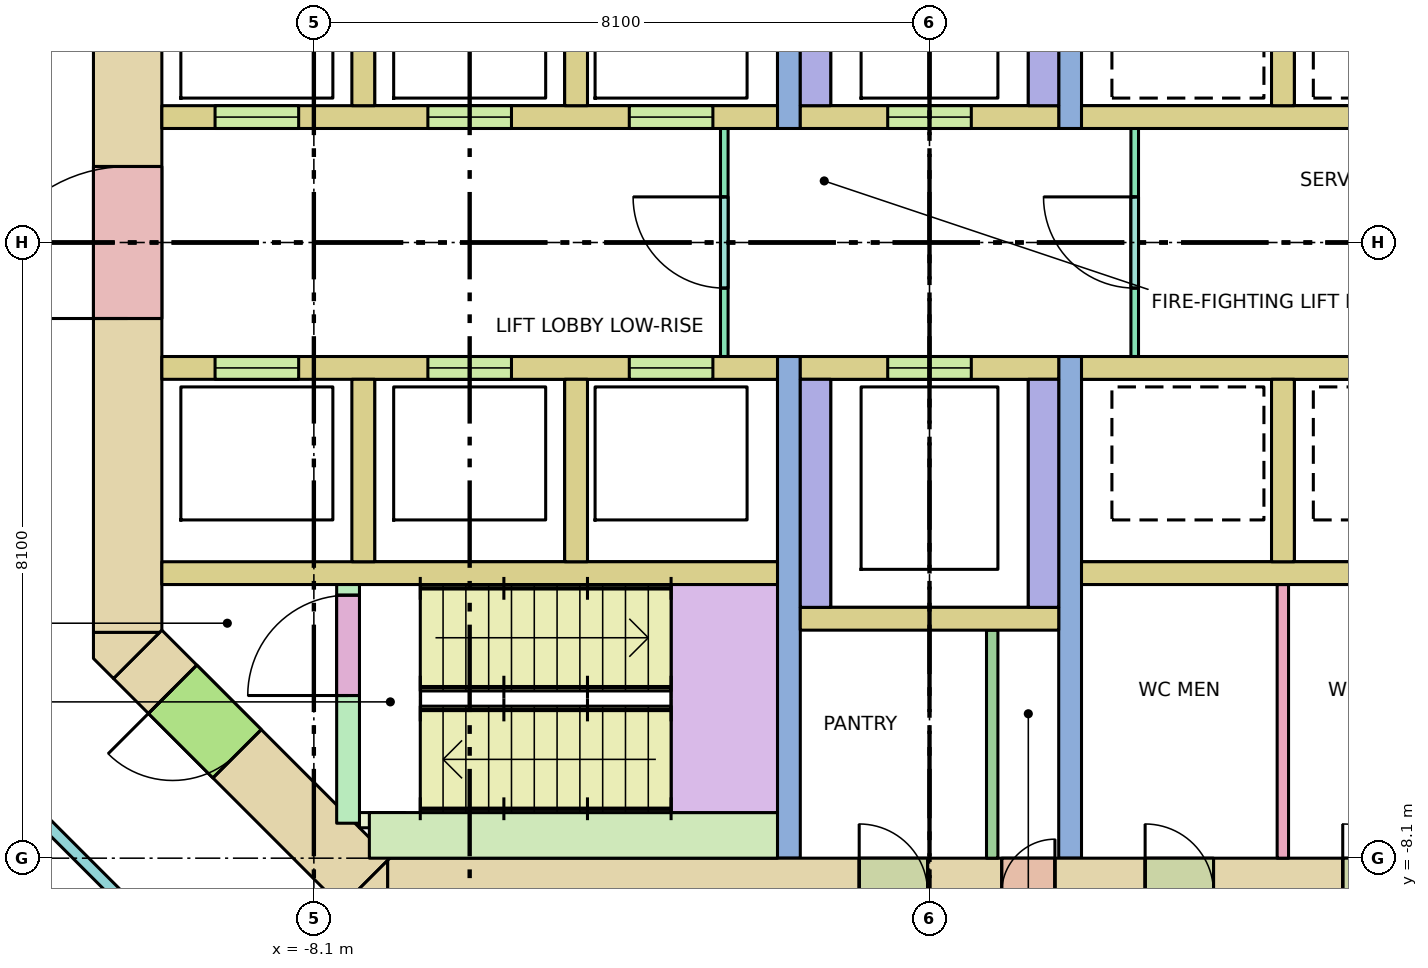
"""IFC4 building model, lengths in metres.
Left out: names, types, materials, properties, quantities, classifications, styles, units other than length and angle.
Written with IfcOpenShell. Run it as: python <this file> out.ifc"""

import sys

from ifc_helpers import new_model, si_unit, direction, frame, frame_2d, origin, place, context, subcontext, project, spatial, polyline, rectangle, outline, extrude, element, fill, save


model = new_model("IFC4")
c1 = context("Model", 3, precision=1e-05, world=origin(), true_north=direction((0.0, 1.0)))
c2 = subcontext(c1, "Body", "Model", "MODEL_VIEW")
j1 = project(units=[si_unit("LENGTHUNIT", "METRE"), si_unit("PLANEANGLEUNIT", "RADIAN")], contexts=[c1])
p1 = place(None, origin())
s1 = spatial("IfcSite", under=j1, at=p1, CompositionType="ELEMENT")
p2 = place(p1, origin())
s2 = spatial("IfcBuilding", under=s1, at=p2, CompositionType="ELEMENT")
p3 = place(p2, frame((0.0, 0.0, 39.0)))
s3 = spatial("IfcBuildingStorey", under=s2, at=p3, CompositionType="ELEMENT", Elevation=39.0)
p4 = place(p3, frame((-7.13, -8.55, -0.28), z_axis=(0.0, 0.0, 1.0), x_axis=(1.0, 0.0, 0.0)))
e1 = element("IfcWall", 1, at=p4, inside=s3, PredefinedType="SHEAR", context=c2, shape_type="SweptSolid", body=[
    extrude(rectangle(XDim=14.26, YDim=0.9, at=frame_2d((7.13, 0.0))), origin(), (0.0, 0.0, 1.0), 4.0),
])
p5 = place(p4, frame((8.08, 0.0, 0.28)))
e2 = element("IfcOpeningElement", 2, at=p5, cuts=e1, PredefinedType="OPENING", context=c2, shape_type="SweptSolid", body=[
    extrude(rectangle(XDim=0.7, YDim=2.1, at=frame_2d((0.35, 1.05))), frame((0.0, 0.46, 0.0), z_axis=(0.0, -1.0, 0.0), x_axis=(1.0, 0.0, 0.0)), (0.0, 0.0, 1.0), 0.92),
])
p6 = place(p4, frame((6.205, 0.0, 0.28)))
e3 = element("IfcOpeningElement", 3, at=p6, cuts=e1, PredefinedType="OPENING", context=c2, shape_type="SweptSolid", body=[
    extrude(rectangle(XDim=0.9, YDim=2.1, at=frame_2d((0.45, 1.05))), frame((0.0, 0.46, 0.0), z_axis=(0.0, -1.0, 0.0), x_axis=(1.0, 0.0, 0.0)), (0.0, 0.0, 1.0), 0.92),
])
p7 = place(p4, frame((9.967, 0.0, 0.28)))
e4 = element("IfcOpeningElement", 4, at=p7, cuts=e1, PredefinedType="OPENING", context=c2, shape_type="SweptSolid", body=[
    extrude(rectangle(XDim=0.9, YDim=2.1, at=frame_2d((0.45, 1.05))), frame((0.0, 0.46, 0.0), z_axis=(0.0, -1.0, 0.0), x_axis=(1.0, 0.0, 0.0)), (0.0, 0.0, 1.0), 0.92),
])
p8 = place(p4, frame((12.567, 0.0, 0.28)))
e5 = element("IfcOpeningElement", 5, at=p8, cuts=e1, PredefinedType="OPENING", context=c2, shape_type="SweptSolid", body=[
    extrude(rectangle(XDim=0.9, YDim=2.1, at=frame_2d((0.45, 1.05))), frame((0.0, 0.46, 0.0), z_axis=(0.0, -1.0, 0.0), x_axis=(1.0, 0.0, 0.0)), (0.0, 0.0, 1.0), 0.92),
])
p9 = place(p3, frame((-10.55, -5.13, -0.28), z_axis=(0.0, 0.0, 1.0), x_axis=(0.0, 1.0, 0.0)))
e6 = element("IfcWall", 6, at=p9, inside=s3, PredefinedType="SHEAR", context=c2, shape_type="SweptSolid", body=[
    extrude(rectangle(XDim=10.26, YDim=0.9, at=frame_2d((5.13, 0.0))), origin(), (0.0, 0.0, 1.0), 4.0),
])
p10 = place(p9, frame((4.13, 0.0, 0.28)))
e7 = element("IfcOpeningElement", 7, at=p10, cuts=e6, PredefinedType="OPENING", context=c2, shape_type="SweptSolid", body=[
    extrude(rectangle(XDim=2.0, YDim=2.1, at=frame_2d((1.0, 1.05))), frame((0.0, 0.46, 0.0), z_axis=(0.0, -1.0, 0.0), x_axis=(1.0, 0.0, 0.0)), (0.0, 0.0, 1.0), 0.92),
])
p11 = place(p3, frame((-7.418, -8.418, -0.28), z_axis=(0.0, 0.0, 1.0), x_axis=(-0.707106781187, 0.707106781187, 0.0)))
e8 = element("IfcWall", 8, at=p11, inside=s3, PredefinedType="SHEAR", context=c2, shape_type="SweptSolid", body=[
    extrude(rectangle(XDim=4.243, YDim=0.9, at=frame_2d((2.121, 0.0))), origin(), (0.0, 0.0, 1.0), 4.0),
])
p12 = place(p11, frame((2.393, 0.0, 0.28)))
e9 = element("IfcOpeningElement", 9, at=p12, cuts=e8, PredefinedType="OPENING", context=c2, shape_type="SweptSolid", body=[
    extrude(rectangle(XDim=1.2, YDim=2.1, at=frame_2d((0.6, 1.05))), frame((0.0, 0.46, 0.0), z_axis=(0.0, -1.0, 0.0), x_axis=(1.0, 0.0, 0.0)), (0.0, 0.0, 1.0), 0.92),
])
p13 = place(p3, frame((0.0, 0.0, -0.28)))
e10 = element("IfcWall", 10, at=p13, inside=s3, PredefinedType="SHEAR", context=c2, shape_type="SweptSolid", body=[
    extrude(outline(polyline([(-7.473, -9.0), (-7.736, -8.736), (-7.13, -8.13), (-7.13, -9.0), (-7.473, -9.0)])), origin(), (0.0, 0.0, 1.0), 4.0),
])
p14 = place(p3, frame((0.0, 0.0, -0.28)))
e11 = element("IfcWall", 11, at=p14, inside=s3, PredefinedType="SHEAR", context=c2, shape_type="SweptSolid", body=[
    extrude(outline(polyline([(-11.0, -5.473), (-11.0, -5.13), (-10.13, -5.13), (-10.736, -5.736), (-11.0, -5.473)])), origin(), (0.0, 0.0, 1.0), 4.0),
])
for number, where, z_axis, x_axis in (
    (12, (-10.1, -4.35, 0.0), (0.0, 0.0, 1.0), (1.0, 0.0, 0.0)),
    (13, (2.0, -4.35, 0.0), (0.0, 0.0, 1.0), (1.0, 0.0, 0.0)),
):
    element("IfcWall", number, at=place(p3, frame(where, z_axis=z_axis, x_axis=x_axis)), inside=s3, PredefinedType="SOLIDWALL", context=c2, shape_type="SweptSolid", body=[
        extrude(rectangle(XDim=8.1, YDim=0.3, at=frame_2d((4.05, 0.0))), origin(), (0.0, 0.0, 1.0), 3.72),
    ])
p15 = place(p3, frame((-10.1, 1.65, 0.0), z_axis=(0.0, 0.0, 1.0), x_axis=(1.0, 0.0, 0.0)))
e14 = element("IfcWall", 14, at=p15, inside=s3, PredefinedType="SOLIDWALL", context=c2, shape_type="SweptSolid", body=[
    extrude(rectangle(XDim=8.1, YDim=0.3, at=frame_2d((4.05, 0.0))), origin(), (0.0, 0.0, 1.0), 3.72),
])
p16 = place(p15, frame((0.7, 0.0, 0.0)))
e15 = element("IfcOpeningElement", 15, at=p16, cuts=e14, PredefinedType="OPENING", context=c2, shape_type="SweptSolid", body=[
    extrude(rectangle(XDim=1.1, YDim=2.1, at=frame_2d((0.55, 1.05))), frame((0.0, 0.16, 0.0), z_axis=(0.0, -1.0, 0.0), x_axis=(1.0, 0.0, 0.0)), (0.0, 0.0, 1.0), 0.32),
])
p17 = place(p15, frame((3.5, 0.0, 0.0)))
e16 = element("IfcOpeningElement", 16, at=p17, cuts=e14, PredefinedType="OPENING", context=c2, shape_type="SweptSolid", body=[
    extrude(rectangle(XDim=1.1, YDim=2.1, at=frame_2d((0.55, 1.05))), frame((0.0, 0.16, 0.0), z_axis=(0.0, -1.0, 0.0), x_axis=(1.0, 0.0, 0.0)), (0.0, 0.0, 1.0), 0.32),
])
p18 = place(p15, frame((6.15, 0.0, 0.0)))
e17 = element("IfcOpeningElement", 17, at=p18, cuts=e14, PredefinedType="OPENING", context=c2, shape_type="SweptSolid", body=[
    extrude(rectangle(XDim=1.1, YDim=2.1, at=frame_2d((0.55, 1.05))), frame((0.0, 0.16, 0.0), z_axis=(0.0, -1.0, 0.0), x_axis=(1.0, 0.0, 0.0)), (0.0, 0.0, 1.0), 0.32),
])
p19 = place(p3, frame((-10.1, -1.65, 0.0), z_axis=(0.0, 0.0, 1.0), x_axis=(1.0, 0.0, 0.0)))
e18 = element("IfcWall", 18, at=p19, inside=s3, PredefinedType="SOLIDWALL", context=c2, shape_type="SweptSolid", body=[
    extrude(rectangle(XDim=8.1, YDim=0.3, at=frame_2d((4.05, 0.0))), origin(), (0.0, 0.0, 1.0), 3.72),
])
p20 = place(p19, frame((0.7, 0.0, 0.0)))
e19 = element("IfcOpeningElement", 19, at=p20, cuts=e18, PredefinedType="OPENING", context=c2, shape_type="SweptSolid", body=[
    extrude(rectangle(XDim=1.1, YDim=2.1, at=frame_2d((0.55, 1.05))), frame((0.0, 0.16, 0.0), z_axis=(0.0, -1.0, 0.0), x_axis=(1.0, 0.0, 0.0)), (0.0, 0.0, 1.0), 0.32),
])
p21 = place(p19, frame((3.5, 0.0, 0.0)))
e20 = element("IfcOpeningElement", 20, at=p21, cuts=e18, PredefinedType="OPENING", context=c2, shape_type="SweptSolid", body=[
    extrude(rectangle(XDim=1.1, YDim=2.1, at=frame_2d((0.55, 1.05))), frame((0.0, 0.16, 0.0), z_axis=(0.0, -1.0, 0.0), x_axis=(1.0, 0.0, 0.0)), (0.0, 0.0, 1.0), 0.32),
])
p22 = place(p19, frame((6.15, 0.0, 0.0)))
e21 = element("IfcOpeningElement", 21, at=p22, cuts=e18, PredefinedType="OPENING", context=c2, shape_type="SweptSolid", body=[
    extrude(rectangle(XDim=1.1, YDim=2.1, at=frame_2d((0.55, 1.05))), frame((0.0, 0.16, 0.0), z_axis=(0.0, -1.0, 0.0), x_axis=(1.0, 0.0, 0.0)), (0.0, 0.0, 1.0), 0.32),
])
for number, where, z_axis, x_axis in (
    (22, (2.0, 1.65, 0.0), (0.0, 0.0, 1.0), (1.0, 0.0, 0.0)),
    (23, (2.0, -1.65, 0.0), (0.0, 0.0, 1.0), (1.0, 0.0, 0.0)),
):
    element("IfcWall", number, at=place(p3, frame(where, z_axis=z_axis, x_axis=x_axis)), inside=s3, PredefinedType="SOLIDWALL", context=c2, shape_type="SweptSolid", body=[
        extrude(rectangle(XDim=8.1, YDim=0.3, at=frame_2d((4.05, 0.0))), origin(), (0.0, 0.0, 1.0), 3.72),
    ])
for number, where, z_axis, x_axis in (
    (24, (-7.45, 1.8, 0.0), (0.0, 0.0, 1.0), (0.0, 1.0, 0.0)),
    (25, (-7.45, -4.2, 0.0), (0.0, 0.0, 1.0), (0.0, 1.0, 0.0)),
    (26, (-4.65, 1.8, 0.0), (0.0, 0.0, 1.0), (0.0, 1.0, 0.0)),
    (27, (-4.65, -4.2, 0.0), (0.0, 0.0, 1.0), (0.0, 1.0, 0.0)),
    (28, (4.65, 1.8, 0.0), (0.0, 0.0, 1.0), (0.0, 1.0, 0.0)),
    (29, (4.65, -4.2, 0.0), (0.0, 0.0, 1.0), (0.0, 1.0, 0.0)),
):
    element("IfcWall", number, at=place(p3, frame(where, z_axis=z_axis, x_axis=x_axis)), inside=s3, PredefinedType="SOLIDWALL", context=c2, shape_type="SweptSolid", body=[
        extrude(rectangle(XDim=2.4, YDim=0.3, at=frame_2d((1.2, 0.0))), origin(), (0.0, 0.0, 1.0), 3.72),
    ])
for number, where, z_axis, x_axis in (
    (30, (-1.85, 1.5, 0.0), (0.0, 0.0, 1.0), (0.0, 1.0, 0.0)),
    (31, (-1.85, -8.1, 0.0), (0.0, 0.0, 1.0), (0.0, 1.0, 0.0)),
    (32, (1.85, 1.5, 0.0), (0.0, 0.0, 1.0), (0.0, 1.0, 0.0)),
    (33, (1.85, -8.1, 0.0), (0.0, 0.0, 1.0), (0.0, 1.0, 0.0)),
):
    element("IfcWall", number, at=place(p3, frame(where, z_axis=z_axis, x_axis=x_axis)), inside=s3, PredefinedType="SHEAR", context=c2, shape_type="SweptSolid", body=[
        extrude(rectangle(XDim=6.6, YDim=0.3, at=frame_2d((3.3, 0.0))), origin(), (0.0, 0.0, 1.0), 3.72),
    ])
p23 = place(p3, frame((-1.7, 1.65, 0.0), z_axis=(0.0, 0.0, 1.0), x_axis=(1.0, 0.0, 0.0)))
e34 = element("IfcWall", 34, at=p23, inside=s3, PredefinedType="SOLIDWALL", context=c2, shape_type="SweptSolid", body=[
    extrude(rectangle(XDim=3.4, YDim=0.3, at=frame_2d((1.7, 0.0))), origin(), (0.0, 0.0, 1.0), 3.72),
])
p24 = place(p23, frame((1.15, 0.0, 0.0)))
e35 = element("IfcOpeningElement", 35, at=p24, cuts=e34, PredefinedType="OPENING", context=c2, shape_type="SweptSolid", body=[
    extrude(rectangle(XDim=1.1, YDim=2.1, at=frame_2d((0.55, 1.05))), frame((0.0, 0.16, 0.0), z_axis=(0.0, -1.0, 0.0), x_axis=(1.0, 0.0, 0.0)), (0.0, 0.0, 1.0), 0.32),
])
p25 = place(p3, frame((-1.7, -1.65, 0.0), z_axis=(0.0, 0.0, 1.0), x_axis=(1.0, 0.0, 0.0)))
e36 = element("IfcWall", 36, at=p25, inside=s3, PredefinedType="SOLIDWALL", context=c2, shape_type="SweptSolid", body=[
    extrude(rectangle(XDim=3.4, YDim=0.3, at=frame_2d((1.7, 0.0))), origin(), (0.0, 0.0, 1.0), 3.72),
])
p26 = place(p25, frame((1.15, 0.0, 0.0)))
e37 = element("IfcOpeningElement", 37, at=p26, cuts=e36, PredefinedType="OPENING", context=c2, shape_type="SweptSolid", body=[
    extrude(rectangle(XDim=1.1, YDim=2.1, at=frame_2d((0.55, 1.05))), frame((0.0, 0.16, 0.0), z_axis=(0.0, -1.0, 0.0), x_axis=(1.0, 0.0, 0.0)), (0.0, 0.0, 1.0), 0.32),
])
for number, where, z_axis, x_axis in (
    (38, (-1.5, 1.8, 0.0), (0.0, 0.0, 1.0), (0.0, 1.0, 0.0)),
    (39, (-1.5, -4.8, 0.0), (0.0, 0.0, 1.0), (0.0, 1.0, 0.0)),
    (40, (1.5, 1.8, 0.0), (0.0, 0.0, 1.0), (0.0, 1.0, 0.0)),
    (41, (1.5, -4.8, 0.0), (0.0, 0.0, 1.0), (0.0, 1.0, 0.0)),
):
    element("IfcWall", number, at=place(p3, frame(where, z_axis=z_axis, x_axis=x_axis)), inside=s3, PredefinedType="SOLIDWALL", context=c2, shape_type="SweptSolid", body=[
        extrude(rectangle(XDim=3.0, YDim=0.4, at=frame_2d((1.5, 0.0))), origin(), (0.0, 0.0, 1.0), 3.72),
    ])
p27 = place(p3, frame((-1.7, -4.95, 0.0), z_axis=(0.0, 0.0, 1.0), x_axis=(1.0, 0.0, 0.0)))
e42 = element("IfcWall", 42, at=p27, inside=s3, PredefinedType="SOLIDWALL", context=c2, shape_type="SweptSolid", body=[
    extrude(rectangle(XDim=3.4, YDim=0.3, at=frame_2d((1.7, 0.0))), origin(), (0.0, 0.0, 1.0), 3.72),
])
p28 = place(p3, frame((-7.65, -7.64, 0.0), z_axis=(0.0, 0.0, 1.0), x_axis=(0.0, 1.0, 0.0)))
e43 = element("IfcWall", 43, at=p28, inside=s3, PredefinedType="SHEAR", context=c2, shape_type="SweptSolid", body=[
    extrude(rectangle(XDim=3.14, YDim=0.3, at=frame_2d((1.57, 0.0))), origin(), (0.0, 0.0, 1.0), 3.72),
])
p29 = place(p28, frame((1.68, 0.0, 0.0)))
e44 = element("IfcOpeningElement", 44, at=p29, cuts=e43, PredefinedType="OPENING", context=c2, shape_type="SweptSolid", body=[
    extrude(rectangle(XDim=1.32, YDim=2.1, at=frame_2d((0.66, 1.05))), frame((0.0, 0.16, 0.0), z_axis=(0.0, -1.0, 0.0), x_axis=(1.0, 0.0, 0.0)), (0.0, 0.0, 1.0), 0.32),
])
p30 = place(p3, frame((-7.5, -7.6, 0.0), z_axis=(0.0, 0.0, 1.0), x_axis=(1.0, 0.0, 0.0)))
e45 = element("IfcWall", 45, at=p30, inside=s3, PredefinedType="SHEAR", context=c2, shape_type="SweptSolid", body=[
    extrude(rectangle(XDim=0.6, YDim=0.2, at=frame_2d((0.3, 0.0))), origin(), (0.0, 0.0, 1.0), 3.72),
])
p31 = place(p3, frame((-7.37, -7.8, 0.0), z_axis=(0.0, 0.0, 1.0), x_axis=(1.0, 0.0, 0.0)))
e46 = element("IfcWall", 46, at=p31, inside=s3, PredefinedType="SHEAR", context=c2, shape_type="SweptSolid", body=[
    extrude(rectangle(XDim=5.37, YDim=0.6, at=frame_2d((2.685, 0.0))), origin(), (0.0, 0.0, 1.0), 3.72),
])
p32 = place(p3, frame((-2.7, -1.5, 0.0), z_axis=(0.0, 0.0, 1.0), x_axis=(0.0, 1.0, 0.0)))
e47 = element("IfcWall", 47, at=p32, inside=s3, PredefinedType="PARTITIONING", context=c2, shape_type="SweptSolid", body=[
    extrude(rectangle(XDim=3.0, YDim=0.1, at=frame_2d((1.5, 0.0))), origin(), (0.0, 0.0, 1.0), 3.72),
])
p33 = place(p32, frame((0.9, 0.0, 0.0)))
e48 = element("IfcOpeningElement", 48, at=p33, cuts=e47, PredefinedType="OPENING", context=c2, shape_type="SweptSolid", body=[
    extrude(rectangle(XDim=1.2, YDim=2.1, at=frame_2d((0.6, 1.05))), frame((0.0, 0.06, 0.0), z_axis=(0.0, -1.0, 0.0), x_axis=(1.0, 0.0, 0.0)), (0.0, 0.0, 1.0), 0.12),
])
p34 = place(p3, frame((2.7, -1.5, 0.0), z_axis=(0.0, 0.0, 1.0), x_axis=(0.0, 1.0, 0.0)))
e49 = element("IfcWall", 49, at=p34, inside=s3, PredefinedType="PARTITIONING", context=c2, shape_type="SweptSolid", body=[
    extrude(rectangle(XDim=3.0, YDim=0.1, at=frame_2d((1.5, 0.0))), origin(), (0.0, 0.0, 1.0), 3.72),
])
p35 = place(p34, frame((0.9, 0.0, 0.0)))
e50 = element("IfcOpeningElement", 50, at=p35, cuts=e49, PredefinedType="OPENING", context=c2, shape_type="SweptSolid", body=[
    extrude(rectangle(XDim=1.2, YDim=2.1, at=frame_2d((0.6, 1.05))), frame((0.0, 0.06, 0.0), z_axis=(0.0, -1.0, 0.0), x_axis=(1.0, 0.0, 0.0)), (0.0, 0.0, 1.0), 0.12),
])
p36 = place(p3, frame((0.825, -8.1, 0.0), z_axis=(0.0, 0.0, 1.0), x_axis=(0.0, 1.0, 0.0)))
e51 = element("IfcWall", 51, at=p36, inside=s3, PredefinedType="PARTITIONING", context=c2, shape_type="SweptSolid", body=[
    extrude(rectangle(XDim=3.0, YDim=0.15, at=frame_2d((1.5, 0.0))), origin(), (0.0, 0.0, 1.0), 3.72),
])
p37 = place(p3, frame((4.649, -8.1, 0.0), z_axis=(0.0, 0.0, 1.0), x_axis=(0.0, 1.0, 0.0)))
e52 = element("IfcWall", 52, at=p37, inside=s3, PredefinedType="PARTITIONING", context=c2, shape_type="SweptSolid", body=[
    extrude(rectangle(XDim=3.6, YDim=0.15, at=frame_2d((1.8, 0.0))), origin(), (0.0, 0.0, 1.0), 3.72),
])
p38 = place(p3, frame((-10.534, -8.731, 0.0), z_axis=(0.0, 0.0, 1.0), x_axis=(-0.707106781187, 0.707106781187, 0.0)))
e53 = element("IfcWall", 53, at=p38, inside=s3, PredefinedType="PARTITIONING", context=c2, shape_type="SweptSolid", body=[
    extrude(rectangle(XDim=3.399, YDim=0.15, at=frame_2d((1.7, 0.0))), origin(), (0.0, 0.0, 1.0), 2.82),
])
p39 = place(p16, origin())
e54 = element("IfcDoor", 54, at=p39, inside=s3, OperationType="DOUBLE_DOOR_SLIDING", PredefinedType="DOOR", context=c2, shape_type="SweptSolid", body=[
    extrude(rectangle(XDim=1.1, YDim=2.1, at=frame_2d((0.55, 1.05))), frame((0.0, 0.025, 0.0), z_axis=(0.0, -1.0, 0.0), x_axis=(1.0, 0.0, 0.0)), (0.0, 0.0, 1.0), 0.05),
])
fill(e15, e54)
p40 = place(p17, origin())
e55 = element("IfcDoor", 55, at=p40, inside=s3, OperationType="DOUBLE_DOOR_SLIDING", PredefinedType="DOOR", context=c2, shape_type="SweptSolid", body=[
    extrude(rectangle(XDim=1.1, YDim=2.1, at=frame_2d((0.55, 1.05))), frame((0.0, 0.025, 0.0), z_axis=(0.0, -1.0, 0.0), x_axis=(1.0, 0.0, 0.0)), (0.0, 0.0, 1.0), 0.05),
])
fill(e16, e55)
p41 = place(p18, origin())
e56 = element("IfcDoor", 56, at=p41, inside=s3, OperationType="DOUBLE_DOOR_SLIDING", PredefinedType="DOOR", context=c2, shape_type="SweptSolid", body=[
    extrude(rectangle(XDim=1.1, YDim=2.1, at=frame_2d((0.55, 1.05))), frame((0.0, 0.025, 0.0), z_axis=(0.0, -1.0, 0.0), x_axis=(1.0, 0.0, 0.0)), (0.0, 0.0, 1.0), 0.05),
])
fill(e17, e56)
p42 = place(p20, origin())
e57 = element("IfcDoor", 57, at=p42, inside=s3, OperationType="DOUBLE_DOOR_SLIDING", PredefinedType="DOOR", context=c2, shape_type="SweptSolid", body=[
    extrude(rectangle(XDim=1.1, YDim=2.1, at=frame_2d((0.55, 1.05))), frame((0.0, 0.025, 0.0), z_axis=(0.0, -1.0, 0.0), x_axis=(1.0, 0.0, 0.0)), (0.0, 0.0, 1.0), 0.05),
])
fill(e19, e57)
p43 = place(p21, origin())
e58 = element("IfcDoor", 58, at=p43, inside=s3, OperationType="DOUBLE_DOOR_SLIDING", PredefinedType="DOOR", context=c2, shape_type="SweptSolid", body=[
    extrude(rectangle(XDim=1.1, YDim=2.1, at=frame_2d((0.55, 1.05))), frame((0.0, 0.025, 0.0), z_axis=(0.0, -1.0, 0.0), x_axis=(1.0, 0.0, 0.0)), (0.0, 0.0, 1.0), 0.05),
])
fill(e20, e58)
p44 = place(p22, origin())
e59 = element("IfcDoor", 59, at=p44, inside=s3, OperationType="DOUBLE_DOOR_SLIDING", PredefinedType="DOOR", context=c2, shape_type="SweptSolid", body=[
    extrude(rectangle(XDim=1.1, YDim=2.1, at=frame_2d((0.55, 1.05))), frame((0.0, 0.025, 0.0), z_axis=(0.0, -1.0, 0.0), x_axis=(1.0, 0.0, 0.0)), (0.0, 0.0, 1.0), 0.05),
])
fill(e21, e59)
p45 = place(p24, origin())
e60 = element("IfcDoor", 60, at=p45, inside=s3, OperationType="DOUBLE_DOOR_SLIDING", PredefinedType="DOOR", context=c2, shape_type="SweptSolid", body=[
    extrude(rectangle(XDim=1.1, YDim=2.1, at=frame_2d((0.55, 1.05))), frame((0.0, 0.025, 0.0), z_axis=(0.0, -1.0, 0.0), x_axis=(1.0, 0.0, 0.0)), (0.0, 0.0, 1.0), 0.05),
])
fill(e35, e60)
p46 = place(p26, origin())
e61 = element("IfcDoor", 61, at=p46, inside=s3, OperationType="DOUBLE_DOOR_SLIDING", PredefinedType="DOOR", context=c2, shape_type="SweptSolid", body=[
    extrude(rectangle(XDim=1.1, YDim=2.1, at=frame_2d((0.55, 1.05))), frame((0.0, 0.025, 0.0), z_axis=(0.0, -1.0, 0.0), x_axis=(1.0, 0.0, 0.0)), (0.0, 0.0, 1.0), 0.05),
])
fill(e37, e61)
p47 = place(p29, origin())
e62 = element("IfcDoor", 62, at=p47, inside=s3, OperationType="DOUBLE_DOOR_SINGLE_SWING", PredefinedType="DOOR", context=c2, shape_type="SweptSolid", body=[
    extrude(rectangle(XDim=1.32, YDim=2.1, at=frame_2d((0.66, 1.05))), frame((0.0, 0.025, 0.0), z_axis=(0.0, -1.0, 0.0), x_axis=(1.0, 0.0, 0.0)), (0.0, 0.0, 1.0), 0.05),
])
fill(e44, e62)
p48 = place(p12, origin())
e63 = element("IfcDoor", 63, at=p48, inside=s3, OperationType="SINGLE_SWING_RIGHT", PredefinedType="DOOR", context=c2, shape_type="SweptSolid", body=[
    extrude(rectangle(XDim=1.2, YDim=2.1, at=frame_2d((0.6, 1.05))), frame((0.0, 0.025, 0.0), z_axis=(0.0, -1.0, 0.0), x_axis=(1.0, 0.0, 0.0)), (0.0, 0.0, 1.0), 0.05),
])
fill(e9, e63)
p49 = place(p10, origin())
e64 = element("IfcDoor", 64, at=p49, inside=s3, OperationType="DOUBLE_DOOR_SINGLE_SWING", PredefinedType="DOOR", context=c2, shape_type="SweptSolid", body=[
    extrude(rectangle(XDim=2.0, YDim=2.1, at=frame_2d((1.0, 1.05))), frame((0.0, 0.025, 0.0), z_axis=(0.0, -1.0, 0.0), x_axis=(1.0, 0.0, 0.0)), (0.0, 0.0, 1.0), 0.05),
])
fill(e7, e64)
p50 = place(p33, origin())
e65 = element("IfcDoor", 65, at=p50, inside=s3, OperationType="SINGLE_SWING_RIGHT", PredefinedType="DOOR", context=c2, shape_type="SweptSolid", body=[
    extrude(rectangle(XDim=1.2, YDim=2.1, at=frame_2d((0.6, 1.05))), frame((0.0, 0.025, 0.0), z_axis=(0.0, -1.0, 0.0), x_axis=(1.0, 0.0, 0.0)), (0.0, 0.0, 1.0), 0.05),
])
fill(e48, e65)
p51 = place(p35, origin())
e66 = element("IfcDoor", 66, at=p51, inside=s3, OperationType="SINGLE_SWING_RIGHT", PredefinedType="DOOR", context=c2, shape_type="SweptSolid", body=[
    extrude(rectangle(XDim=1.2, YDim=2.1, at=frame_2d((0.6, 1.05))), frame((0.0, 0.025, 0.0), z_axis=(0.0, -1.0, 0.0), x_axis=(1.0, 0.0, 0.0)), (0.0, 0.0, 1.0), 0.05),
])
fill(e50, e66)
save(model, sys.argv[1])
